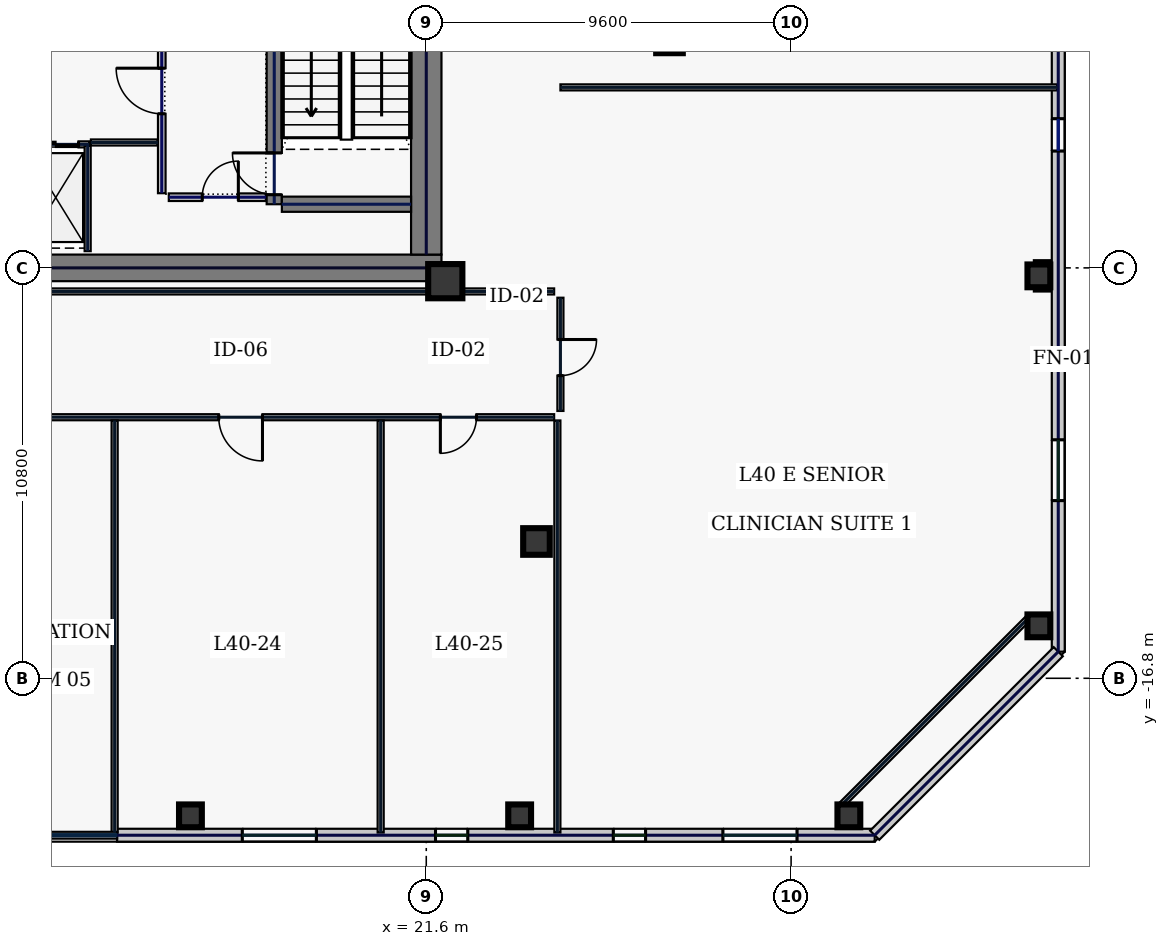
"""IFC4 building model, lengths in metres.
Left out: names, types, materials, properties, quantities, classifications, styles, units other than length and angle.
Written with IfcOpenShell. Run it as: python <this file> out.ifc"""

import sys

from ifc_helpers import new_model, si_unit, direction, frame, frame_2d, origin, origin_2d, place, context, subcontext, project, spatial, rectangle, hollow_rectangle, extrude, element, fill, save


model = new_model("IFC4")
c1 = context("Model", 3, precision=1e-05, world=origin(), true_north=direction((0.0, 1.0)))
c2 = subcontext(c1, "Body", "Model", "MODEL_VIEW")
j1 = project(units=[si_unit("LENGTHUNIT", "METRE"), si_unit("PLANEANGLEUNIT", "RADIAN")], contexts=[c1])
p1 = place(None, origin())
s1 = spatial("IfcSite", under=j1, at=p1, CompositionType="ELEMENT")
p2 = place(p1, origin())
s2 = spatial("IfcBuilding", under=s1, at=p2, CompositionType="ELEMENT")
p3 = place(p2, frame((0.0, 0.0, 176.2)))
s3 = spatial("IfcBuildingStorey", under=s2, at=p3, CompositionType="ELEMENT", Elevation=176.2)
p4 = place(p3, frame((10.45, -6.0, 0.0), z_axis=(0.0, 0.0, 1.0), x_axis=(1.0, 0.0, 0.0)))
e1 = element("IfcWall", 1, at=p4, inside=s3, PredefinedType="SHEAR", context=c2, shape_type="SweptSolid", body=[
    extrude(rectangle(XDim=11.55, YDim=0.7, at=frame_2d((5.775, 0.0))), origin(), (0.0, 0.0, 1.0), 3.74),
])
p5 = place(p3, frame((21.6, -5.65, 0.0), z_axis=(0.0, 0.0, 1.0), x_axis=(0.0, 1.0, 0.0)))
e2 = element("IfcWall", 2, at=p5, inside=s3, PredefinedType="SHEAR", context=c2, shape_type="SweptSolid", body=[
    extrude(rectangle(XDim=11.3, YDim=0.8, at=frame_2d((5.65, 0.0))), origin(), (0.0, 0.0, 1.0), 3.74),
])
p6 = place(p3, frame((17.6, -4.325, 0.0), z_axis=(0.0, 0.0, 1.0), x_axis=(0.0, 1.0, 0.0)))
e3 = element("IfcWall", 3, at=p6, inside=s3, PredefinedType="SHEAR", context=c2, shape_type="SweptSolid", body=[
    extrude(rectangle(XDim=8.65, YDim=0.4, at=frame_2d((4.325, 0.0))), origin(), (0.0, 0.0, 1.0), 3.74),
])
p7 = place(p6, frame((0.25, 0.0, 0.0)))
e4 = element("IfcOpeningElement", 4, at=p7, cuts=e3, PredefinedType="OPENING", context=c2, shape_type="SweptSolid", body=[
    extrude(rectangle(XDim=1.1, YDim=2.2, at=frame_2d((0.55, 1.1))), frame((0.0, 0.21, 0.0), z_axis=(0.0, -1.0, 0.0), x_axis=(1.0, 0.0, 0.0)), (0.0, 0.0, 1.0), 0.42),
])
p8 = place(p3, frame((17.8, -4.325, 0.0), z_axis=(0.0, 0.0, 1.0), x_axis=(1.0, 0.0, 0.0)))
e5 = element("IfcWall", 5, at=p8, inside=s3, PredefinedType="SHEAR", context=c2, shape_type="SweptSolid", body=[
    extrude(rectangle(XDim=3.4, YDim=0.4, at=frame_2d((1.7, 0.0))), origin(), (0.0, 0.0, 1.0), 3.74),
])
p9 = place(p3, frame((22.1, -6.35, 0.0), z_axis=(0.0, 0.0, 1.0), x_axis=(1.0, 0.0, 0.0)))
e6 = element("IfcColumn", 6, at=p9, inside=s3, PredefinedType="COLUMN", context=c2, shape_type="SweptSolid", body=[
    extrude(hollow_rectangle(XDim=0.9, YDim=0.9, WallThickness=0.04, at=origin_2d()), origin(), (0.0, 0.0, 1.0), 3.74),
])
for number, where, z_axis, x_axis in (
    (7, (24.5, -13.2, 0.0), (0.0, 0.0, 1.0), (1.0, 0.0, 0.0)),
    (8, (28.0, 0.0, 0.0), (0.0, 0.0, 1.0), (1.0, 0.0, 0.0)),
):
    element("IfcColumn", number, at=place(p3, frame(where, z_axis=z_axis, x_axis=x_axis)), inside=s3, PredefinedType="COLUMN", context=c2, shape_type="SweptSolid", body=[
        extrude(hollow_rectangle(XDim=0.7, YDim=0.7, WallThickness=0.032, at=origin_2d()), origin(), (0.0, 0.0, 1.0), 3.74),
    ])
for number, where, z_axis, x_axis in (
    (9, (15.394, -20.42, 0.0), (0.0, 0.0, 1.0), (1.0, 0.0, 0.0)),
    (10, (24.057, -20.42, 0.0), (0.0, 0.0, 1.0), (1.0, 0.0, 0.0)),
    (11, (32.72, -20.42, 0.0), (0.0, 0.0, 1.0), (1.0, 0.0, 0.0)),
    (12, (37.72, -15.42, 0.0), (0.0, 0.0, 1.0), (1.0, 0.0, 0.0)),
    (13, (37.72, -6.21, 0.0), (0.0, 0.0, 1.0), (1.0, 0.0, 0.0)),
):
    element("IfcColumn", number, at=place(p3, frame(where, z_axis=z_axis, x_axis=x_axis)), inside=s3, PredefinedType="COLUMN", context=c2, shape_type="SweptSolid", body=[
        extrude(hollow_rectangle(XDim=0.6, YDim=0.6, WallThickness=0.028, at=origin_2d()), origin(), (0.0, 0.0, 1.0), 3.74),
    ])
p10 = place(p3, frame((13.463, -20.93, 0.0), z_axis=(0.0, 0.0, 1.0), x_axis=(1.0, 0.0, 0.0)))
e14 = element("IfcWall", 14, at=p10, inside=s3, PredefinedType="STANDARD", context=c2, shape_type="SweptSolid", body=[
    extrude(rectangle(XDim=19.937, YDim=0.34, at=frame_2d((9.969, 0.0))), origin(), (0.0, 0.0, 1.0), 3.74),
])
p11 = place(p10, frame((3.295, 0.0, 0.8)))
e15 = element("IfcOpeningElement", 15, at=p11, cuts=e14, PredefinedType="OPENING", context=c2, shape_type="SweptSolid", body=[
    extrude(rectangle(XDim=1.95, YDim=2.1, at=frame_2d((0.975, 1.05))), frame((0.0, 0.18, 0.0), z_axis=(0.0, -1.0, 0.0), x_axis=(1.0, 0.0, 0.0)), (0.0, 0.0, 1.0), 0.36),
])
p12 = place(p10, frame((8.38, 0.0, 0.8)))
e16 = element("IfcOpeningElement", 16, at=p12, cuts=e14, PredefinedType="OPENING", context=c2, shape_type="SweptSolid", body=[
    extrude(rectangle(XDim=0.85, YDim=1.85, at=frame_2d((0.425, 0.925))), frame((0.0, 0.18, 0.0), z_axis=(0.0, -1.0, 0.0), x_axis=(1.0, 0.0, 0.0)), (0.0, 0.0, 1.0), 0.36),
])
p13 = place(p10, frame((13.058, 0.0, 0.8)))
e17 = element("IfcOpeningElement", 17, at=p13, cuts=e14, PredefinedType="OPENING", context=c2, shape_type="SweptSolid", body=[
    extrude(rectangle(XDim=0.85, YDim=1.85, at=frame_2d((0.425, 0.925))), frame((0.0, 0.18, 0.0), z_axis=(0.0, -1.0, 0.0), x_axis=(1.0, 0.0, 0.0)), (0.0, 0.0, 1.0), 0.36),
])
p14 = place(p10, frame((15.943, 0.0, 0.8)))
e18 = element("IfcOpeningElement", 18, at=p14, cuts=e14, PredefinedType="OPENING", context=c2, shape_type="SweptSolid", body=[
    extrude(rectangle(XDim=1.95, YDim=2.1, at=frame_2d((0.975, 1.05))), frame((0.0, 0.18, 0.0), z_axis=(0.0, -1.0, 0.0), x_axis=(1.0, 0.0, 0.0)), (0.0, 0.0, 1.0), 0.36),
])
p15 = place(p3, frame((38.23, -16.1, 0.0), z_axis=(0.0, 0.0, 1.0), x_axis=(0.0, 1.0, 0.0)))
e19 = element("IfcWall", 19, at=p15, inside=s3, PredefinedType="STANDARD", context=c2, shape_type="SweptSolid", body=[
    extrude(rectangle(XDim=38.2, YDim=0.34, at=frame_2d((19.1, 0.0))), origin(), (0.0, 0.0, 1.0), 3.74),
])
p16 = place(p15, frame((3.975, 0.0, 0.58)))
e20 = element("IfcOpeningElement", 20, at=p16, cuts=e19, PredefinedType="OPENING", context=c2, shape_type="SweptSolid", body=[
    extrude(rectangle(XDim=1.6, YDim=2.3, at=frame_2d((0.8, 1.15))), frame((0.0, 0.18, 0.0), z_axis=(0.0, -1.0, 0.0), x_axis=(1.0, 0.0, 0.0)), (0.0, 0.0, 1.0), 0.36),
])
p17 = place(p15, frame((13.175, 0.0, 0.75)))
e21 = element("IfcOpeningElement", 21, at=p17, cuts=e19, PredefinedType="OPENING", context=c2, shape_type="SweptSolid", body=[
    extrude(rectangle(XDim=0.85, YDim=1.85, at=frame_2d((0.425, 0.925))), frame((0.0, 0.18, 0.0), z_axis=(0.0, -1.0, 0.0), x_axis=(1.0, 0.0, 0.0)), (0.0, 0.0, 1.0), 0.36),
])
p18 = place(p15, frame((23.075, 0.0, 0.58)))
e22 = element("IfcOpeningElement", 22, at=p18, cuts=e19, PredefinedType="OPENING", context=c2, shape_type="SweptSolid", body=[
    extrude(rectangle(XDim=1.6, YDim=2.3, at=frame_2d((0.8, 1.15))), frame((0.0, 0.18, 0.0), z_axis=(0.0, -1.0, 0.0), x_axis=(1.0, 0.0, 0.0)), (0.0, 0.0, 1.0), 0.36),
])
p19 = place(p15, frame((32.625, 0.0, 0.58)))
e23 = element("IfcOpeningElement", 23, at=p19, cuts=e19, PredefinedType="OPENING", context=c2, shape_type="SweptSolid", body=[
    extrude(rectangle(XDim=1.6, YDim=2.3, at=frame_2d((0.8, 1.15))), frame((0.0, 0.18, 0.0), z_axis=(0.0, -1.0, 0.0), x_axis=(1.0, 0.0, 0.0)), (0.0, 0.0, 1.0), 0.36),
])
p20 = place(p3, frame((33.4, -20.93, 0.0), z_axis=(0.0, 0.0, 1.0), x_axis=(0.707124652085, 0.707088909836, 0.0)))
e24 = element("IfcWall", 24, at=p20, inside=s3, PredefinedType="STANDARD", context=c2, shape_type="SweptSolid", body=[
    extrude(rectangle(XDim=6.831, YDim=0.34, at=frame_2d((3.415, 0.0))), origin(), (0.0, 0.0, 1.0), 3.74),
])
p21 = place(p3, frame((10.97, -2.75, 0.0), z_axis=(0.0, 0.0, 1.0), x_axis=(1.0, 0.0, 0.0)))
e25 = element("IfcWall", 25, at=p21, inside=s3, PredefinedType="PARTITIONING", context=c2, shape_type="SweptSolid", body=[
    extrude(rectangle(XDim=1.76, YDim=0.16, at=frame_2d((0.88, 0.0))), origin(), (0.0, 0.0, 1.0), 3.74),
])
p22 = place(p21, frame((0.28, 0.0, 0.0)))
e26 = element("IfcOpeningElement", 26, at=p22, cuts=e25, PredefinedType="OPENING", context=c2, shape_type="SweptSolid", body=[
    extrude(rectangle(XDim=1.2, YDim=2.2, at=frame_2d((0.6, 1.1))), frame((0.0, 0.09, 0.0), z_axis=(0.0, -1.0, 0.0), x_axis=(1.0, 0.0, 0.0)), (0.0, 0.0, 1.0), 0.18),
])
p23 = place(p3, frame((14.825, -4.14, 0.0), z_axis=(0.0, 0.0, 1.0), x_axis=(1.0, 0.0, 0.0)))
e27 = element("IfcWall", 27, at=p23, inside=s3, PredefinedType="SOLIDWALL", context=c2, shape_type="SweptSolid", body=[
    extrude(rectangle(XDim=2.555, YDim=0.2, at=frame_2d((1.277, 0.0))), origin(), (0.0, 0.0, 1.0), 3.74),
])
p24 = place(p23, frame((0.88, 0.0, 0.0)))
e28 = element("IfcOpeningElement", 28, at=p24, cuts=e27, PredefinedType="OPENING", context=c2, shape_type="SweptSolid", body=[
    extrude(rectangle(XDim=0.95, YDim=2.2, at=frame_2d((0.475, 1.1))), frame((0.0, 0.11, 0.0), z_axis=(0.0, -1.0, 0.0), x_axis=(1.0, 0.0, 0.0)), (0.0, 0.0, 1.0), 0.22),
])
p25 = place(p3, frame((12.775, -2.7, 0.0), z_axis=(0.0, 0.0, 1.0), x_axis=(1.0, 0.0, 0.0)))
e29 = element("IfcWall", 29, at=p25, inside=s3, PredefinedType="PARTITIONING", context=c2, shape_type="SweptSolid", body=[
    extrude(rectangle(XDim=1.76, YDim=0.16, at=frame_2d((0.88, 0.0))), origin(), (0.0, 0.0, 1.0), 3.74),
])
p26 = place(p3, frame((12.69, -5.56, 0.0), z_axis=(0.0, 0.0, 1.0), x_axis=(0.0, 1.0, 0.0)))
e30 = element("IfcWall", 30, at=p26, inside=s3, PredefinedType="PARTITIONING", context=c2, shape_type="SweptSolid", body=[
    extrude(rectangle(XDim=2.775, YDim=0.16, at=frame_2d((1.388, 0.0))), origin(), (0.0, 0.0, 1.0), 3.74),
])
p27 = place(p3, frame((14.64, -4.035, 0.0), z_axis=(0.0, 0.0, 1.0), x_axis=(0.0, 1.0, 0.0)))
e31 = element("IfcWall", 31, at=p27, inside=s3, PredefinedType="SOLIDWALL", context=c2, shape_type="SweptSolid", body=[
    extrude(rectangle(XDim=4.075, YDim=0.2, at=frame_2d((2.038, 0.0))), origin(), (0.0, 0.0, 1.0), 3.74),
])
p28 = place(p27, frame((2.09, 0.0, 0.0)))
e32 = element("IfcOpeningElement", 32, at=p28, cuts=e31, PredefinedType="OPENING", context=c2, shape_type="SweptSolid", body=[
    extrude(rectangle(XDim=1.2, YDim=2.2, at=frame_2d((0.6, 1.1))), frame((0.0, 0.11, 0.0), z_axis=(0.0, -1.0, 0.0), x_axis=(1.0, 0.0, 0.0)), (0.0, 0.0, 1.0), 0.22),
])
p29 = place(p3, frame((32.479, -20.18, 0.0), z_axis=(0.0, 0.0, 1.0), x_axis=(0.707106781187, 0.707106781187, 0.0)))
e33 = element("IfcWall", 33, at=p29, inside=s3, PredefinedType="PARTITIONING", context=c2, shape_type="SweptSolid", body=[
    extrude(rectangle(XDim=7.071, YDim=0.16, at=frame_2d((3.536, 0.0))), origin(), (0.0, 0.0, 1.0), 3.74),
])
p30 = place(p3, frame((10.63, -6.62, 0.0), z_axis=(0.0, 0.0, 1.0), x_axis=(1.0, 0.0, 0.0)))
e34 = element("IfcWall", 34, at=p30, inside=s3, PredefinedType="PARTITIONING", context=c2, shape_type="SweptSolid", body=[
    extrude(rectangle(XDim=14.335, YDim=0.16, at=frame_2d((7.167, 0.0))), origin(), (0.0, 0.0, 1.0), 3.74),
])
p31 = place(p3, frame((25.13, -6.785, 0.0), z_axis=(0.0, 0.0, 1.0), x_axis=(0.0, -1.0, 0.0)))
e35 = element("IfcWall", 35, at=p31, inside=s3, PredefinedType="PARTITIONING", context=c2, shape_type="SweptSolid", body=[
    extrude(rectangle(XDim=2.98, YDim=0.16, at=frame_2d((1.49, 0.0))), origin(), (0.0, 0.0, 1.0), 3.74),
])
p32 = place(p31, frame((1.1, 0.0, 0.0)))
e36 = element("IfcOpeningElement", 36, at=p32, cuts=e35, PredefinedType="OPENING", context=c2, shape_type="SweptSolid", body=[
    extrude(rectangle(XDim=0.95, YDim=2.2, at=frame_2d((0.475, 1.1))), frame((0.0, 0.09, 0.0), z_axis=(0.0, -1.0, 0.0), x_axis=(1.0, 0.0, 0.0)), (0.0, 0.0, 1.0), 0.18),
])
p33 = place(p3, frame((24.965, -9.93, 0.0), z_axis=(0.0, 0.0, 1.0), x_axis=(-1.0, 0.0, 0.0)))
e37 = element("IfcWall", 37, at=p33, inside=s3, PredefinedType="PARTITIONING", context=c2, shape_type="SweptSolid", body=[
    extrude(rectangle(XDim=49.93, YDim=0.16, at=frame_2d((24.965, 0.0))), origin(), (0.0, 0.0, 1.0), 3.74),
])
p34 = place(p33, frame((47.106, 0.0, 0.0)))
e38 = element("IfcOpeningElement", 38, at=p34, cuts=e37, PredefinedType="OPENING", context=c2, shape_type="SweptSolid", body=[
    extrude(rectangle(XDim=0.95, YDim=2.2, at=frame_2d((0.475, 1.1))), frame((0.0, 0.09, 0.0), z_axis=(0.0, -1.0, 0.0), x_axis=(1.0, 0.0, 0.0)), (0.0, 0.0, 1.0), 0.18),
])
p35 = place(p33, frame((39.975, 0.0, 0.0)))
e39 = element("IfcOpeningElement", 39, at=p35, cuts=e37, PredefinedType="OPENING", context=c2, shape_type="SweptSolid", body=[
    extrude(rectangle(XDim=0.95, YDim=2.2, at=frame_2d((0.475, 1.1))), frame((0.0, 0.09, 0.0), z_axis=(0.0, -1.0, 0.0), x_axis=(1.0, 0.0, 0.0)), (0.0, 0.0, 1.0), 0.18),
])
p36 = place(p33, frame((31.175, 0.0, 0.0)))
e40 = element("IfcOpeningElement", 40, at=p36, cuts=e37, PredefinedType="OPENING", context=c2, shape_type="SweptSolid", body=[
    extrude(rectangle(XDim=1.05, YDim=2.2, at=frame_2d((0.525, 1.1))), frame((0.0, 0.09, 0.0), z_axis=(0.0, -1.0, 0.0), x_axis=(1.0, 0.0, 0.0)), (0.0, 0.0, 1.0), 0.18),
])
p37 = place(p33, frame((23.375, 0.0, 0.0)))
e41 = element("IfcOpeningElement", 41, at=p37, cuts=e37, PredefinedType="OPENING", context=c2, shape_type="SweptSolid", body=[
    extrude(rectangle(XDim=0.95, YDim=2.2, at=frame_2d((0.475, 1.1))), frame((0.0, 0.09, 0.0), z_axis=(0.0, -1.0, 0.0), x_axis=(1.0, 0.0, 0.0)), (0.0, 0.0, 1.0), 0.18),
])
p38 = place(p33, frame((15.275, 0.0, 0.0)))
e42 = element("IfcOpeningElement", 42, at=p38, cuts=e37, PredefinedType="OPENING", context=c2, shape_type="SweptSolid", body=[
    extrude(rectangle(XDim=0.95, YDim=2.2, at=frame_2d((0.475, 1.1))), frame((0.0, 0.09, 0.0), z_axis=(0.0, -1.0, 0.0), x_axis=(1.0, 0.0, 0.0)), (0.0, 0.0, 1.0), 0.18),
])
p39 = place(p33, frame((7.675, 0.0, 0.0)))
e43 = element("IfcOpeningElement", 43, at=p39, cuts=e37, PredefinedType="OPENING", context=c2, shape_type="SweptSolid", body=[
    extrude(rectangle(XDim=1.15, YDim=2.2, at=frame_2d((0.575, 1.1))), frame((0.0, 0.09, 0.0), z_axis=(0.0, -1.0, 0.0), x_axis=(1.0, 0.0, 0.0)), (0.0, 0.0, 1.0), 0.18),
])
p40 = place(p33, frame((2.044, 0.0, 0.0)))
e44 = element("IfcOpeningElement", 44, at=p40, cuts=e37, PredefinedType="OPENING", context=c2, shape_type="SweptSolid", body=[
    extrude(rectangle(XDim=0.95, YDim=2.2, at=frame_2d((0.475, 1.1))), frame((0.0, 0.09, 0.0), z_axis=(0.0, -1.0, 0.0), x_axis=(1.0, 0.0, 0.0)), (0.0, 0.0, 1.0), 0.18),
])
for number, where, z_axis, x_axis in (
    (45, (25.05, -20.86, 0.0), (0.0, 0.0, 1.0), (0.0, 1.0, 0.0)),
    (46, (13.4, -20.86, 0.0), (0.0, 0.0, 1.0), (0.0, 1.0, 0.0)),
    (47, (20.4, -20.86, 0.0), (0.0, 0.0, 1.0), (0.0, 1.0, 0.0)),
):
    element("IfcWall", number, at=place(p3, frame(where, z_axis=z_axis, x_axis=x_axis)), inside=s3, PredefinedType="PARTITIONING", context=c2, shape_type="SweptSolid", body=[
        extrude(rectangle(XDim=10.845, YDim=0.16, at=frame_2d((5.423, 0.0))), origin(), (0.0, 0.0, 1.0), 3.74),
    ])
p41 = place(p3, frame((25.13, -1.25, 0.0), z_axis=(0.0, 0.0, 1.0), x_axis=(1.0, 0.0, 0.0)))
e48 = element("IfcWall", 48, at=p41, inside=s3, PredefinedType="PARTITIONING", context=c2, shape_type="SweptSolid", body=[
    extrude(rectangle(XDim=13.08, YDim=0.16, at=frame_2d((6.54, 0.0))), origin(), (0.0, 0.0, 1.0), 3.74),
])
p42 = place(p11, origin())
e49 = element("IfcWindow", 49, at=p42, inside=s3, PartitioningType="SINGLE_PANEL", PredefinedType="WINDOW", context=c2, shape_type="SweptSolid", body=[
    extrude(rectangle(XDim=1.95, YDim=2.1, at=frame_2d((0.975, 1.05))), frame((0.0, 0.03, 0.0), z_axis=(0.0, -1.0, 0.0), x_axis=(1.0, 0.0, 0.0)), (0.0, 0.0, 1.0), 0.06),
])
fill(e15, e49)
p43 = place(p12, origin())
e50 = element("IfcWindow", 50, at=p43, inside=s3, PartitioningType="SINGLE_PANEL", PredefinedType="WINDOW", context=c2, shape_type="SweptSolid", body=[
    extrude(rectangle(XDim=0.85, YDim=1.85, at=frame_2d((0.425, 0.925))), frame((0.0, 0.03, 0.0), z_axis=(0.0, -1.0, 0.0), x_axis=(1.0, 0.0, 0.0)), (0.0, 0.0, 1.0), 0.06),
])
fill(e16, e50)
p44 = place(p13, origin())
e51 = element("IfcWindow", 51, at=p44, inside=s3, PartitioningType="SINGLE_PANEL", PredefinedType="WINDOW", context=c2, shape_type="SweptSolid", body=[
    extrude(rectangle(XDim=0.85, YDim=1.85, at=frame_2d((0.425, 0.925))), frame((0.0, 0.03, 0.0), z_axis=(0.0, -1.0, 0.0), x_axis=(1.0, 0.0, 0.0)), (0.0, 0.0, 1.0), 0.06),
])
fill(e17, e51)
p45 = place(p14, origin())
e52 = element("IfcWindow", 52, at=p45, inside=s3, PartitioningType="SINGLE_PANEL", PredefinedType="WINDOW", context=c2, shape_type="SweptSolid", body=[
    extrude(rectangle(XDim=1.95, YDim=2.1, at=frame_2d((0.975, 1.05))), frame((0.0, 0.03, 0.0), z_axis=(0.0, -1.0, 0.0), x_axis=(1.0, 0.0, 0.0)), (0.0, 0.0, 1.0), 0.06),
])
fill(e18, e52)
p46 = place(p16, origin())
e53 = element("IfcWindow", 53, at=p46, inside=s3, PartitioningType="SINGLE_PANEL", PredefinedType="WINDOW", context=c2, shape_type="SweptSolid", body=[
    extrude(rectangle(XDim=1.6, YDim=2.3, at=frame_2d((0.8, 1.15))), frame((0.0, 0.03, 0.0), z_axis=(0.0, -1.0, 0.0), x_axis=(1.0, 0.0, 0.0)), (0.0, 0.0, 1.0), 0.06),
])
fill(e20, e53)
p47 = place(p17, origin())
e54 = element("IfcWindow", 54, at=p47, inside=s3, PartitioningType="SINGLE_PANEL", PredefinedType="WINDOW", context=c2, shape_type="SweptSolid", body=[
    extrude(rectangle(XDim=0.85, YDim=1.85, at=frame_2d((0.425, 0.925))), frame((0.0, 0.03, 0.0), z_axis=(0.0, -1.0, 0.0), x_axis=(1.0, 0.0, 0.0)), (0.0, 0.0, 1.0), 0.06),
])
fill(e21, e54)
p48 = place(p7, origin())
e55 = element("IfcDoor", 55, at=p48, inside=s3, OperationType="SINGLE_SWING_RIGHT", PredefinedType="DOOR", context=c2, shape_type="SweptSolid", body=[
    extrude(rectangle(XDim=1.1, YDim=2.2, at=frame_2d((0.55, 1.1))), frame((0.0, 0.025, 0.0), z_axis=(0.0, -1.0, 0.0), x_axis=(1.0, 0.0, 0.0)), (0.0, 0.0, 1.0), 0.05),
])
fill(e4, e55)
p49 = place(p22, origin())
e56 = element("IfcDoor", 56, at=p49, inside=s3, OperationType="SLIDING_TO_LEFT", PredefinedType="DOOR", context=c2, shape_type="SweptSolid", body=[
    extrude(rectangle(XDim=1.2, YDim=2.2, at=frame_2d((0.6, 1.1))), frame((0.0, 0.025, 0.0), z_axis=(0.0, -1.0, 0.0), x_axis=(1.0, 0.0, 0.0)), (0.0, 0.0, 1.0), 0.05),
])
fill(e26, e56)
p50 = place(p24, origin())
e57 = element("IfcDoor", 57, at=p50, inside=s3, OperationType="SINGLE_SWING_RIGHT", PredefinedType="DOOR", context=c2, shape_type="SweptSolid", body=[
    extrude(rectangle(XDim=0.95, YDim=2.2, at=frame_2d((0.475, 1.1))), frame((0.0, 0.025, 0.0), z_axis=(0.0, -1.0, 0.0), x_axis=(1.0, 0.0, 0.0)), (0.0, 0.0, 1.0), 0.05),
])
fill(e28, e57)
p51 = place(p28, origin())
e58 = element("IfcDoor", 58, at=p51, inside=s3, OperationType="SINGLE_SWING_RIGHT", PredefinedType="DOOR", context=c2, shape_type="SweptSolid", body=[
    extrude(rectangle(XDim=1.2, YDim=2.2, at=frame_2d((0.6, 1.1))), frame((0.0, 0.025, 0.0), z_axis=(0.0, -1.0, 0.0), x_axis=(1.0, 0.0, 0.0)), (0.0, 0.0, 1.0), 0.05),
])
fill(e32, e58)
p52 = place(p39, origin())
e59 = element("IfcDoor", 59, at=p52, inside=s3, OperationType="SINGLE_SWING_LEFT", PredefinedType="DOOR", context=c2, shape_type="SweptSolid", body=[
    extrude(rectangle(XDim=1.15, YDim=2.2, at=frame_2d((0.575, 1.1))), frame((0.0, 0.025, 0.0), z_axis=(0.0, -1.0, 0.0), x_axis=(1.0, 0.0, 0.0)), (0.0, 0.0, 1.0), 0.05),
])
fill(e43, e59)
p53 = place(p40, origin())
e60 = element("IfcDoor", 60, at=p53, inside=s3, OperationType="SINGLE_SWING_RIGHT", PredefinedType="DOOR", context=c2, shape_type="SweptSolid", body=[
    extrude(rectangle(XDim=0.95, YDim=2.2, at=frame_2d((0.475, 1.1))), frame((0.0, 0.025, 0.0), z_axis=(0.0, -1.0, 0.0), x_axis=(1.0, 0.0, 0.0)), (0.0, 0.0, 1.0), 0.05),
])
fill(e44, e60)
p54 = place(p32, origin())
e61 = element("IfcDoor", 61, at=p54, inside=s3, OperationType="SINGLE_SWING_LEFT", PredefinedType="DOOR", context=c2, shape_type="SweptSolid", body=[
    extrude(rectangle(XDim=0.95, YDim=2.2, at=frame_2d((0.475, 1.1))), frame((0.0, 0.025, 0.0), z_axis=(0.0, -1.0, 0.0), x_axis=(1.0, 0.0, 0.0)), (0.0, 0.0, 1.0), 0.05),
])
fill(e36, e61)
save(model, sys.argv[1])
